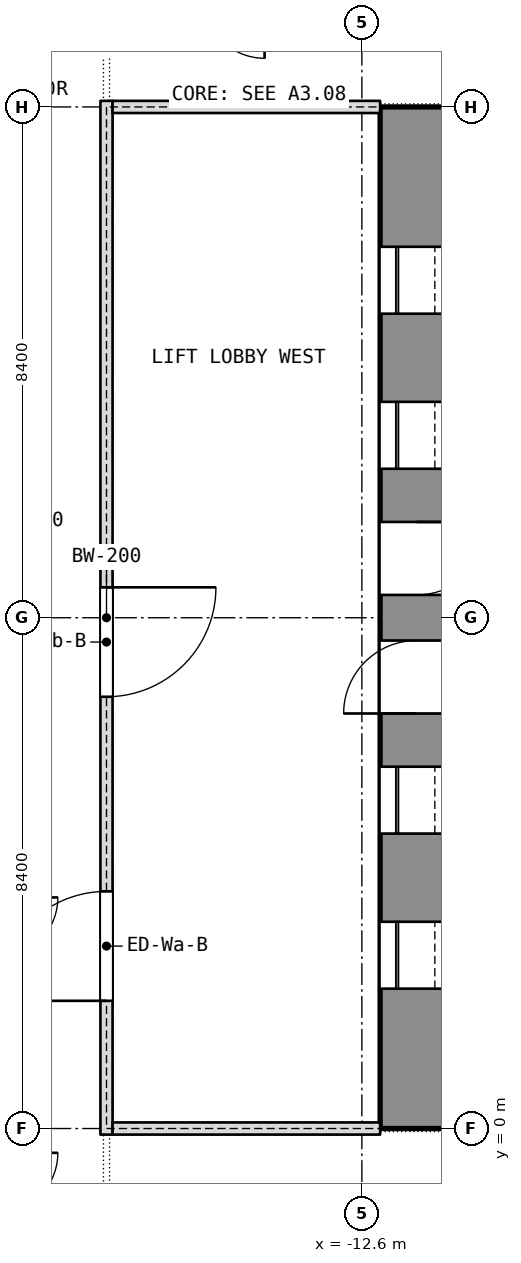
"""IFC4 building model, lengths in metres.
Left out: names, types, materials, properties, quantities, classifications, styles, units other than length and angle.
Written with IfcOpenShell. Run it as: python <this file> out.ifc"""

import sys

from ifc_helpers import new_model, si_unit, direction, frame, frame_2d, origin, place, context, subcontext, project, spatial, rectangle, extrude, element, fill, save


model = new_model("IFC4")
c1 = context("Model", 3, precision=1e-05, world=origin(), true_north=direction((0.0, 1.0)))
c2 = subcontext(c1, "Body", "Model", "MODEL_VIEW")
j1 = project(units=[si_unit("LENGTHUNIT", "METRE"), si_unit("PLANEANGLEUNIT", "RADIAN")], contexts=[c1])
p1 = place(None, origin())
s1 = spatial("IfcSite", under=j1, at=p1, CompositionType="ELEMENT")
p2 = place(p1, origin())
s2 = spatial("IfcBuilding", under=s1, at=p2, CompositionType="ELEMENT")
p3 = place(p2, frame((0.0, 0.0, 54.5)))
s3 = spatial("IfcBuildingStorey", under=s2, at=p3, CompositionType="ELEMENT", Elevation=54.5)
p4 = place(p3, frame((-11.7, 0.0, 0.0), z_axis=(0.0, 0.0, 1.0), x_axis=(0.0, 1.0, 0.0)))
e1 = element("IfcWall", 1, at=p4, inside=s3, PredefinedType="SHEAR", context=c2, shape_type="SweptSolid", body=[
    extrude(rectangle(XDim=16.8, YDim=1.2, at=frame_2d((8.4, 0.0))), origin(), (0.0, 0.0, 1.0), 3.6),
])
p5 = place(p4, frame((2.3, 0.0, 0.0)))
e2 = element("IfcOpeningElement", 2, at=p5, cuts=e1, PredefinedType="OPENING", context=c2, shape_type="SweptSolid", body=[
    extrude(rectangle(XDim=1.1, YDim=2.1, at=frame_2d((0.55, 1.05))), frame((0.0, 0.6, 0.0), z_axis=(0.0, -1.0, 0.0), x_axis=(1.0, 0.0, 0.0)), (0.0, 0.0, 1.0), 1.2),
])
p6 = place(p4, frame((4.85, 0.0, 0.0)))
e3 = element("IfcOpeningElement", 3, at=p6, cuts=e1, PredefinedType="OPENING", context=c2, shape_type="SweptSolid", body=[
    extrude(rectangle(XDim=1.1, YDim=2.1, at=frame_2d((0.55, 1.05))), frame((0.0, 0.6, 0.0), z_axis=(0.0, -1.0, 0.0), x_axis=(1.0, 0.0, 0.0)), (0.0, 0.0, 1.0), 1.2),
])
p7 = place(p4, frame((6.825, 0.0, 0.0)))
e4 = element("IfcOpeningElement", 4, at=p7, cuts=e1, PredefinedType="OPENING", context=c2, shape_type="SweptSolid", body=[
    extrude(rectangle(XDim=1.2, YDim=2.1, at=frame_2d((0.6, 1.05))), frame((0.0, 0.6, 0.0), z_axis=(0.0, -1.0, 0.0), x_axis=(1.0, 0.0, 0.0)), (0.0, 0.0, 1.0), 1.2),
])
p8 = place(p4, frame((13.4, 0.0, 0.0)))
e5 = element("IfcOpeningElement", 5, at=p8, cuts=e1, PredefinedType="OPENING", context=c2, shape_type="SweptSolid", body=[
    extrude(rectangle(XDim=1.1, YDim=2.1, at=frame_2d((0.55, 1.05))), frame((0.0, 0.6, 0.0), z_axis=(0.0, -1.0, 0.0), x_axis=(1.0, 0.0, 0.0)), (0.0, 0.0, 1.0), 1.2),
])
p9 = place(p4, frame((10.85, 0.0, 0.0)))
e6 = element("IfcOpeningElement", 6, at=p9, cuts=e1, PredefinedType="OPENING", context=c2, shape_type="SweptSolid", body=[
    extrude(rectangle(XDim=1.1, YDim=2.1, at=frame_2d((0.55, 1.05))), frame((0.0, 0.6, 0.0), z_axis=(0.0, -1.0, 0.0), x_axis=(1.0, 0.0, 0.0)), (0.0, 0.0, 1.0), 1.2),
])
p10 = place(p4, frame((8.775, 0.0, 0.0)))
e7 = element("IfcOpeningElement", 7, at=p10, cuts=e1, PredefinedType="OPENING", context=c2, shape_type="SweptSolid", body=[
    extrude(rectangle(XDim=1.2, YDim=2.1, at=frame_2d((0.6, 1.05))), frame((0.0, 0.6, 0.0), z_axis=(0.0, -1.0, 0.0), x_axis=(1.0, 0.0, 0.0)), (0.0, 0.0, 1.0), 1.2),
])
p11 = place(p3, frame((-16.8, -0.1, 0.0), z_axis=(0.0, 0.0, 1.0), x_axis=(0.0, 1.0, 0.0)))
e8 = element("IfcWall", 8, at=p11, inside=s3, PredefinedType="PARTITIONING", context=c2, shape_type="SweptSolid", body=[
    extrude(rectangle(XDim=17.0, YDim=0.2, at=frame_2d((8.5, 0.0))), origin(), (0.0, 0.0, 1.0), 3.34),
])
p12 = place(p11, frame((2.2, 0.0, 0.0)))
e9 = element("IfcOpeningElement", 9, at=p12, cuts=e8, PredefinedType="OPENING", context=c2, shape_type="SweptSolid", body=[
    extrude(rectangle(XDim=1.8, YDim=2.1, at=frame_2d((0.9, 1.05))), frame((0.0, 0.1, 0.0), z_axis=(0.0, -1.0, 0.0), x_axis=(1.0, 0.0, 0.0)), (0.0, 0.0, 1.0), 0.2),
])
p13 = place(p11, frame((7.2, 0.0, 0.0)))
e10 = element("IfcOpeningElement", 10, at=p13, cuts=e8, PredefinedType="OPENING", context=c2, shape_type="SweptSolid", body=[
    extrude(rectangle(XDim=1.8, YDim=2.1, at=frame_2d((0.9, 1.05))), frame((0.0, 0.1, 0.0), z_axis=(0.0, -1.0, 0.0), x_axis=(1.0, 0.0, 0.0)), (0.0, 0.0, 1.0), 0.2),
])
for number, where, z_axis, x_axis in (
    (11, (-16.7, 0.0, 0.0), (0.0, 0.0, 1.0), (1.0, 0.0, 0.0)),
    (12, (-16.7, 16.8, 0.0), (0.0, 0.0, 1.0), (1.0, 0.0, 0.0)),
):
    element("IfcWall", number, at=place(p3, frame(where, z_axis=z_axis, x_axis=x_axis)), inside=s3, PredefinedType="PARTITIONING", context=c2, shape_type="SweptSolid", body=[
        extrude(rectangle(XDim=4.4, YDim=0.2, at=frame_2d((2.2, 0.0))), origin(), (0.0, 0.0, 1.0), 2.84),
    ])
p14 = place(p5, origin())
e13 = element("IfcDoor", 13, at=p14, inside=s3, OperationType="SLIDING_TO_LEFT", PredefinedType="DOOR", context=c2, shape_type="SweptSolid", body=[
    extrude(rectangle(XDim=1.1, YDim=2.1, at=frame_2d((0.55, 1.05))), frame((0.0, 0.025, 0.0), z_axis=(0.0, -1.0, 0.0), x_axis=(1.0, 0.0, 0.0)), (0.0, 0.0, 1.0), 0.05),
])
fill(e2, e13)
p15 = place(p6, origin())
e14 = element("IfcDoor", 14, at=p15, inside=s3, OperationType="SLIDING_TO_LEFT", PredefinedType="DOOR", context=c2, shape_type="SweptSolid", body=[
    extrude(rectangle(XDim=1.1, YDim=2.1, at=frame_2d((0.55, 1.05))), frame((0.0, 0.025, 0.0), z_axis=(0.0, -1.0, 0.0), x_axis=(1.0, 0.0, 0.0)), (0.0, 0.0, 1.0), 0.05),
])
fill(e3, e14)
p16 = place(p7, origin())
e15 = element("IfcDoor", 15, at=p16, inside=s3, OperationType="SINGLE_SWING_LEFT", PredefinedType="DOOR", context=c2, shape_type="SweptSolid", body=[
    extrude(rectangle(XDim=1.2, YDim=2.1, at=frame_2d((0.6, 1.05))), frame((0.0, 0.025, 0.0), z_axis=(0.0, -1.0, 0.0), x_axis=(1.0, 0.0, 0.0)), (0.0, 0.0, 1.0), 0.05),
])
fill(e4, e15)
p17 = place(p8, origin())
e16 = element("IfcDoor", 16, at=p17, inside=s3, OperationType="SLIDING_TO_LEFT", PredefinedType="DOOR", context=c2, shape_type="SweptSolid", body=[
    extrude(rectangle(XDim=1.1, YDim=2.1, at=frame_2d((0.55, 1.05))), frame((0.0, 0.025, 0.0), z_axis=(0.0, -1.0, 0.0), x_axis=(1.0, 0.0, 0.0)), (0.0, 0.0, 1.0), 0.05),
])
fill(e5, e16)
p18 = place(p9, origin())
e17 = element("IfcDoor", 17, at=p18, inside=s3, OperationType="SLIDING_TO_LEFT", PredefinedType="DOOR", context=c2, shape_type="SweptSolid", body=[
    extrude(rectangle(XDim=1.1, YDim=2.1, at=frame_2d((0.55, 1.05))), frame((0.0, 0.025, 0.0), z_axis=(0.0, -1.0, 0.0), x_axis=(1.0, 0.0, 0.0)), (0.0, 0.0, 1.0), 0.05),
])
fill(e6, e17)
p19 = place(p10, origin())
e18 = element("IfcDoor", 18, at=p19, inside=s3, OperationType="SINGLE_SWING_LEFT", PredefinedType="DOOR", context=c2, shape_type="SweptSolid", body=[
    extrude(rectangle(XDim=1.2, YDim=2.1, at=frame_2d((0.6, 1.05))), frame((0.0, 0.025, 0.0), z_axis=(0.0, -1.0, 0.0), x_axis=(1.0, 0.0, 0.0)), (0.0, 0.0, 1.0), 0.05),
])
fill(e7, e18)
p20 = place(p12, origin())
e19 = element("IfcDoor", 19, at=p20, inside=s3, OperationType="DOUBLE_DOOR_SINGLE_SWING", PredefinedType="DOOR", context=c2, shape_type="SweptSolid", body=[
    extrude(rectangle(XDim=1.8, YDim=2.1, at=frame_2d((0.9, 1.05))), frame((0.0, 0.025, 0.0), z_axis=(0.0, -1.0, 0.0), x_axis=(1.0, 0.0, 0.0)), (0.0, 0.0, 1.0), 0.05),
])
fill(e9, e19)
p21 = place(p13, origin())
e20 = element("IfcDoor", 20, at=p21, inside=s3, OperationType="DOUBLE_DOOR_SINGLE_SWING", PredefinedType="DOOR", context=c2, shape_type="SweptSolid", body=[
    extrude(rectangle(XDim=1.8, YDim=2.1, at=frame_2d((0.9, 1.05))), frame((0.0, 0.025, 0.0), z_axis=(0.0, -1.0, 0.0), x_axis=(1.0, 0.0, 0.0)), (0.0, 0.0, 1.0), 0.05),
])
fill(e10, e20)
save(model, sys.argv[1])
